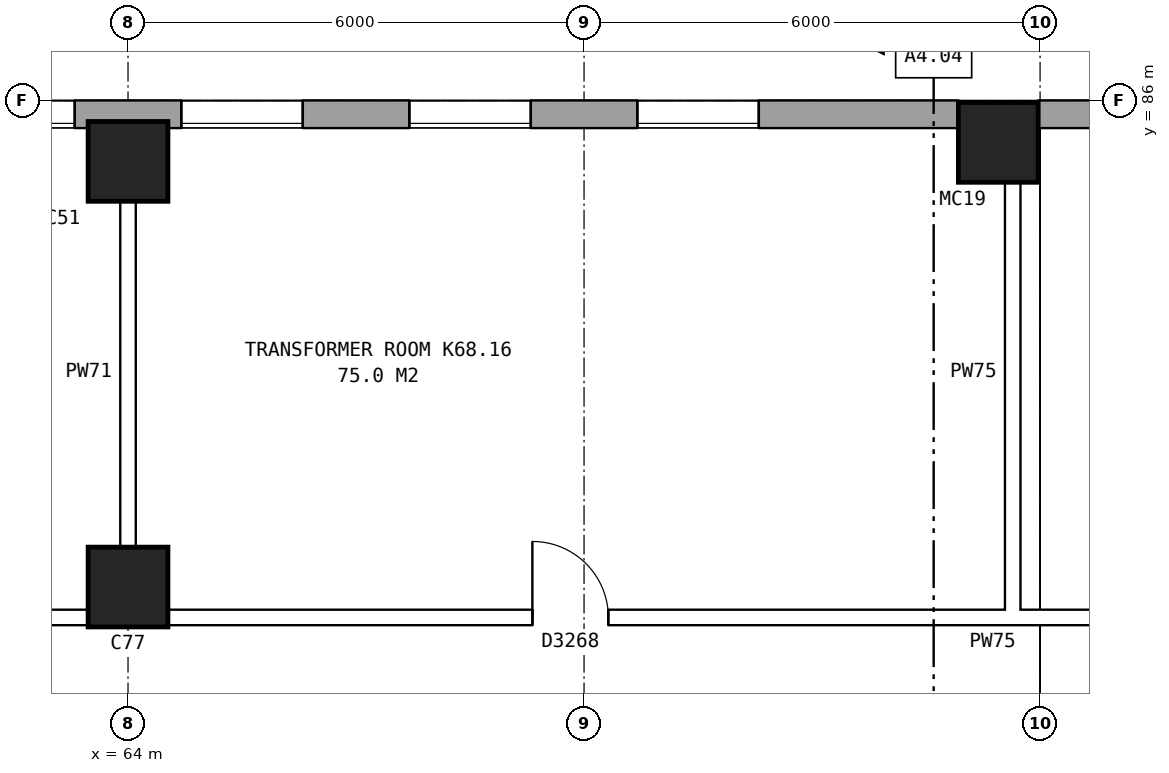
"""IFC4 building model, lengths in metres.
Left out: names, types, materials, properties, quantities, classifications, styles, units other than length and angle.
Written with IfcOpenShell. Run it as: python <this file> out.ifc"""

import sys

from ifc_helpers import new_model, si_unit, direction, frame, frame_2d, origin, origin_2d, place, context, subcontext, project, spatial, rectangle, hollow_rectangle, extrude, element, fill, save


model = new_model("IFC4")
c1 = context("Model", 3, precision=1e-05, world=origin(), true_north=direction((0.0, 1.0)))
c2 = subcontext(c1, "Body", "Model", "MODEL_VIEW")
j1 = project(units=[si_unit("LENGTHUNIT", "METRE"), si_unit("PLANEANGLEUNIT", "RADIAN")], contexts=[c1])
p1 = place(None, origin())
s1 = spatial("IfcSite", under=j1, at=p1, CompositionType="ELEMENT")
p2 = place(p1, origin())
s2 = spatial("IfcBuilding", under=s1, at=p2, CompositionType="ELEMENT")
p3 = place(p2, frame((0.0, 0.0, 243.9)))
s3 = spatial("IfcBuildingStorey", under=s2, at=p3, CompositionType="ELEMENT", Elevation=243.9)
p4 = place(p3, frame((64.0, 79.6, 0.0), z_axis=(0.0, 0.0, 1.0), x_axis=(1.0, 0.0, 0.0)))
e1 = element("IfcColumn", 1, at=p4, inside=s3, PredefinedType="COLUMN", context=c2, shape_type="SweptSolid", body=[
    extrude(rectangle(XDim=1.05, YDim=1.05, at=origin_2d()), origin(), (0.0, 0.0, 1.0), 15.563),
])
p5 = place(p3, frame((64.0, 85.2, 0.0), z_axis=(0.0, 0.0, 1.0), x_axis=(1.0, 0.0, 0.0)))
e2 = element("IfcColumn", 2, at=p5, inside=s3, PredefinedType="COLUMN", context=c2, shape_type="SweptSolid", body=[
    extrude(rectangle(XDim=1.05, YDim=1.05, at=origin_2d()), origin(), (0.0, 0.0, 1.0), 18.363),
])
p6 = place(p3, frame((75.45, 85.45, 0.0), z_axis=(0.0, 0.0, 1.0), x_axis=(1.0, 0.0, 0.0)))
e3 = element("IfcColumn", 3, at=p6, inside=s3, PredefinedType="COLUMN", context=c2, shape_type="SweptSolid", body=[
    extrude(hollow_rectangle(XDim=1.05, YDim=1.05, WallThickness=0.053, at=origin_2d()), origin(), (0.0, 0.0, 1.0), 18.488),
])
p7 = place(p3, frame((131.025, 85.82, 0.0), z_axis=(0.0, 0.0, 1.0), x_axis=(-1.0, 0.0, 0.0)))
e4 = element("IfcWall", 4, at=p7, inside=s3, PredefinedType="STANDARD", context=c2, shape_type="SweptSolid", body=[
    extrude(rectangle(XDim=55.05, YDim=0.36, at=frame_2d((27.525, 0.0))), origin(), (0.0, 0.0, 1.0), 19.21),
])
p8 = place(p7, frame((52.506, 0.0, 1.5)))
e5 = element("IfcOpeningElement", 5, at=p8, cuts=e4, PredefinedType="OPENING", context=c2, shape_type="SweptSolid", body=[
    extrude(rectangle(XDim=1.6, YDim=1.2, at=frame_2d((0.8, 0.6))), frame((0.0, 0.19, 0.0), z_axis=(0.0, -1.0, 0.0), x_axis=(1.0, 0.0, 0.0)), (0.0, 0.0, 1.0), 0.38),
])
p9 = place(p7, frame((49.069, 0.0, 1.5)))
e6 = element("IfcOpeningElement", 6, at=p9, cuts=e4, PredefinedType="OPENING", context=c2, shape_type="SweptSolid", body=[
    extrude(rectangle(XDim=1.6, YDim=1.2, at=frame_2d((0.8, 0.6))), frame((0.0, 0.19, 0.0), z_axis=(0.0, -1.0, 0.0), x_axis=(1.0, 0.0, 0.0)), (0.0, 0.0, 1.0), 0.38),
])
p10 = place(p7, frame((45.631, 0.0, 1.5)))
e7 = element("IfcOpeningElement", 7, at=p10, cuts=e4, PredefinedType="OPENING", context=c2, shape_type="SweptSolid", body=[
    extrude(rectangle(XDim=1.6, YDim=1.2, at=frame_2d((0.8, 0.6))), frame((0.0, 0.19, 0.0), z_axis=(0.0, -1.0, 0.0), x_axis=(1.0, 0.0, 0.0)), (0.0, 0.0, 1.0), 0.38),
])
p11 = place(p7, frame((42.194, 0.0, 1.5)))
e8 = element("IfcOpeningElement", 8, at=p11, cuts=e4, PredefinedType="OPENING", context=c2, shape_type="SweptSolid", body=[
    extrude(rectangle(XDim=1.6, YDim=1.2, at=frame_2d((0.8, 0.6))), frame((0.0, 0.19, 0.0), z_axis=(0.0, -1.0, 0.0), x_axis=(1.0, 0.0, 0.0)), (0.0, 0.0, 1.0), 0.38),
])
p12 = place(p7, frame((38.756, 0.0, 1.5)))
e9 = element("IfcOpeningElement", 9, at=p12, cuts=e4, PredefinedType="OPENING", context=c2, shape_type="SweptSolid", body=[
    extrude(rectangle(XDim=1.6, YDim=1.2, at=frame_2d((0.8, 0.6))), frame((0.0, 0.19, 0.0), z_axis=(0.0, -1.0, 0.0), x_axis=(1.0, 0.0, 0.0)), (0.0, 0.0, 1.0), 0.38),
])
p13 = place(p7, frame((35.319, 0.0, 1.5)))
e10 = element("IfcOpeningElement", 10, at=p13, cuts=e4, PredefinedType="OPENING", context=c2, shape_type="SweptSolid", body=[
    extrude(rectangle(XDim=1.6, YDim=1.2, at=frame_2d((0.8, 0.6))), frame((0.0, 0.19, 0.0), z_axis=(0.0, -1.0, 0.0), x_axis=(1.0, 0.0, 0.0)), (0.0, 0.0, 1.0), 0.38),
])
p14 = place(p7, frame((31.881, 0.0, 1.5)))
e11 = element("IfcOpeningElement", 11, at=p14, cuts=e4, PredefinedType="OPENING", context=c2, shape_type="SweptSolid", body=[
    extrude(rectangle(XDim=1.6, YDim=1.2, at=frame_2d((0.8, 0.6))), frame((0.0, 0.19, 0.0), z_axis=(0.0, -1.0, 0.0), x_axis=(1.0, 0.0, 0.0)), (0.0, 0.0, 1.0), 0.38),
])
p15 = place(p7, frame((28.444, 0.0, 1.5)))
e12 = element("IfcOpeningElement", 12, at=p15, cuts=e4, PredefinedType="OPENING", context=c2, shape_type="SweptSolid", body=[
    extrude(rectangle(XDim=1.6, YDim=1.2, at=frame_2d((0.8, 0.6))), frame((0.0, 0.19, 0.0), z_axis=(0.0, -1.0, 0.0), x_axis=(1.0, 0.0, 0.0)), (0.0, 0.0, 1.0), 0.38),
])
p16 = place(p7, frame((25.006, 0.0, 1.5)))
e13 = element("IfcOpeningElement", 13, at=p16, cuts=e4, PredefinedType="OPENING", context=c2, shape_type="SweptSolid", body=[
    extrude(rectangle(XDim=1.6, YDim=1.2, at=frame_2d((0.8, 0.6))), frame((0.0, 0.19, 0.0), z_axis=(0.0, -1.0, 0.0), x_axis=(1.0, 0.0, 0.0)), (0.0, 0.0, 1.0), 0.38),
])
p17 = place(p7, frame((21.569, 0.0, 1.5)))
e14 = element("IfcOpeningElement", 14, at=p17, cuts=e4, PredefinedType="OPENING", context=c2, shape_type="SweptSolid", body=[
    extrude(rectangle(XDim=1.6, YDim=1.2, at=frame_2d((0.8, 0.6))), frame((0.0, 0.19, 0.0), z_axis=(0.0, -1.0, 0.0), x_axis=(1.0, 0.0, 0.0)), (0.0, 0.0, 1.0), 0.38),
])
p18 = place(p7, frame((18.131, 0.0, 1.5)))
e15 = element("IfcOpeningElement", 15, at=p18, cuts=e4, PredefinedType="OPENING", context=c2, shape_type="SweptSolid", body=[
    extrude(rectangle(XDim=1.6, YDim=1.2, at=frame_2d((0.8, 0.6))), frame((0.0, 0.19, 0.0), z_axis=(0.0, -1.0, 0.0), x_axis=(1.0, 0.0, 0.0)), (0.0, 0.0, 1.0), 0.38),
])
p19 = place(p7, frame((14.694, 0.0, 1.5)))
e16 = element("IfcOpeningElement", 16, at=p19, cuts=e4, PredefinedType="OPENING", context=c2, shape_type="SweptSolid", body=[
    extrude(rectangle(XDim=1.6, YDim=1.2, at=frame_2d((0.8, 0.6))), frame((0.0, 0.19, 0.0), z_axis=(0.0, -1.0, 0.0), x_axis=(1.0, 0.0, 0.0)), (0.0, 0.0, 1.0), 0.38),
])
p20 = place(p7, frame((11.256, 0.0, 1.5)))
e17 = element("IfcOpeningElement", 17, at=p20, cuts=e4, PredefinedType="OPENING", context=c2, shape_type="SweptSolid", body=[
    extrude(rectangle(XDim=1.6, YDim=1.2, at=frame_2d((0.8, 0.6))), frame((0.0, 0.19, 0.0), z_axis=(0.0, -1.0, 0.0), x_axis=(1.0, 0.0, 0.0)), (0.0, 0.0, 1.0), 0.38),
])
p21 = place(p7, frame((7.819, 0.0, 1.5)))
e18 = element("IfcOpeningElement", 18, at=p21, cuts=e4, PredefinedType="OPENING", context=c2, shape_type="SweptSolid", body=[
    extrude(rectangle(XDim=1.6, YDim=1.2, at=frame_2d((0.8, 0.6))), frame((0.0, 0.19, 0.0), z_axis=(0.0, -1.0, 0.0), x_axis=(1.0, 0.0, 0.0)), (0.0, 0.0, 1.0), 0.38),
])
p22 = place(p7, frame((4.381, 0.0, 1.5)))
e19 = element("IfcOpeningElement", 19, at=p22, cuts=e4, PredefinedType="OPENING", context=c2, shape_type="SweptSolid", body=[
    extrude(rectangle(XDim=1.6, YDim=1.2, at=frame_2d((0.8, 0.6))), frame((0.0, 0.19, 0.0), z_axis=(0.0, -1.0, 0.0), x_axis=(1.0, 0.0, 0.0)), (0.0, 0.0, 1.0), 0.38),
])
p23 = place(p7, frame((0.944, 0.0, 1.5)))
e20 = element("IfcOpeningElement", 20, at=p23, cuts=e4, PredefinedType="OPENING", context=c2, shape_type="SweptSolid", body=[
    extrude(rectangle(XDim=1.6, YDim=1.2, at=frame_2d((0.8, 0.6))), frame((0.0, 0.19, 0.0), z_axis=(0.0, -1.0, 0.0), x_axis=(1.0, 0.0, 0.0)), (0.0, 0.0, 1.0), 0.38),
])
p24 = place(p3, frame((74.925, 85.82, 0.0), z_axis=(0.0, 0.0, 1.0), x_axis=(-1.0, 0.0, 0.0)))
e21 = element("IfcWall", 21, at=p24, inside=s3, PredefinedType="STANDARD", context=c2, shape_type="SweptSolid", body=[
    extrude(rectangle(XDim=39.851, YDim=0.36, at=frame_2d((19.925, 0.0))), origin(), (0.0, 0.0, 1.0), 19.21),
])
p25 = place(p24, frame((35.625, 0.0, 1.5)))
e22 = element("IfcOpeningElement", 22, at=p25, cuts=e21, PredefinedType="OPENING", context=c2, shape_type="SweptSolid", body=[
    extrude(rectangle(XDim=1.6, YDim=1.2, at=frame_2d((0.8, 0.6))), frame((0.0, 0.19, 0.0), z_axis=(0.0, -1.0, 0.0), x_axis=(1.0, 0.0, 0.0)), (0.0, 0.0, 1.0), 0.38),
])
p26 = place(p24, frame((32.625, 0.0, 1.5)))
e23 = element("IfcOpeningElement", 23, at=p26, cuts=e21, PredefinedType="OPENING", context=c2, shape_type="SweptSolid", body=[
    extrude(rectangle(XDim=1.6, YDim=1.2, at=frame_2d((0.8, 0.6))), frame((0.0, 0.19, 0.0), z_axis=(0.0, -1.0, 0.0), x_axis=(1.0, 0.0, 0.0)), (0.0, 0.0, 1.0), 0.38),
])
p27 = place(p24, frame((29.625, 0.0, 1.5)))
e24 = element("IfcOpeningElement", 24, at=p27, cuts=e21, PredefinedType="OPENING", context=c2, shape_type="SweptSolid", body=[
    extrude(rectangle(XDim=1.6, YDim=1.2, at=frame_2d((0.8, 0.6))), frame((0.0, 0.19, 0.0), z_axis=(0.0, -1.0, 0.0), x_axis=(1.0, 0.0, 0.0)), (0.0, 0.0, 1.0), 0.38),
])
p28 = place(p24, frame((26.625, 0.0, 1.5)))
e25 = element("IfcOpeningElement", 25, at=p28, cuts=e21, PredefinedType="OPENING", context=c2, shape_type="SweptSolid", body=[
    extrude(rectangle(XDim=1.6, YDim=1.2, at=frame_2d((0.8, 0.6))), frame((0.0, 0.19, 0.0), z_axis=(0.0, -1.0, 0.0), x_axis=(1.0, 0.0, 0.0)), (0.0, 0.0, 1.0), 0.38),
])
p29 = place(p24, frame((23.625, 0.0, 1.5)))
e26 = element("IfcOpeningElement", 26, at=p29, cuts=e21, PredefinedType="OPENING", context=c2, shape_type="SweptSolid", body=[
    extrude(rectangle(XDim=1.6, YDim=1.2, at=frame_2d((0.8, 0.6))), frame((0.0, 0.19, 0.0), z_axis=(0.0, -1.0, 0.0), x_axis=(1.0, 0.0, 0.0)), (0.0, 0.0, 1.0), 0.38),
])
p30 = place(p24, frame((20.625, 0.0, 1.5)))
e27 = element("IfcOpeningElement", 27, at=p30, cuts=e21, PredefinedType="OPENING", context=c2, shape_type="SweptSolid", body=[
    extrude(rectangle(XDim=1.6, YDim=1.2, at=frame_2d((0.8, 0.6))), frame((0.0, 0.19, 0.0), z_axis=(0.0, -1.0, 0.0), x_axis=(1.0, 0.0, 0.0)), (0.0, 0.0, 1.0), 0.38),
])
p31 = place(p24, frame((17.625, 0.0, 1.5)))
e28 = element("IfcOpeningElement", 28, at=p31, cuts=e21, PredefinedType="OPENING", context=c2, shape_type="SweptSolid", body=[
    extrude(rectangle(XDim=1.6, YDim=1.2, at=frame_2d((0.8, 0.6))), frame((0.0, 0.19, 0.0), z_axis=(0.0, -1.0, 0.0), x_axis=(1.0, 0.0, 0.0)), (0.0, 0.0, 1.0), 0.38),
])
p32 = place(p24, frame((14.625, 0.0, 1.5)))
e29 = element("IfcOpeningElement", 29, at=p32, cuts=e21, PredefinedType="OPENING", context=c2, shape_type="SweptSolid", body=[
    extrude(rectangle(XDim=1.6, YDim=1.2, at=frame_2d((0.8, 0.6))), frame((0.0, 0.19, 0.0), z_axis=(0.0, -1.0, 0.0), x_axis=(1.0, 0.0, 0.0)), (0.0, 0.0, 1.0), 0.38),
])
p33 = place(p24, frame((11.625, 0.0, 1.5)))
e30 = element("IfcOpeningElement", 30, at=p33, cuts=e21, PredefinedType="OPENING", context=c2, shape_type="SweptSolid", body=[
    extrude(rectangle(XDim=1.6, YDim=1.2, at=frame_2d((0.8, 0.6))), frame((0.0, 0.19, 0.0), z_axis=(0.0, -1.0, 0.0), x_axis=(1.0, 0.0, 0.0)), (0.0, 0.0, 1.0), 0.38),
])
p34 = place(p24, frame((8.625, 0.0, 1.5)))
e31 = element("IfcOpeningElement", 31, at=p34, cuts=e21, PredefinedType="OPENING", context=c2, shape_type="SweptSolid", body=[
    extrude(rectangle(XDim=1.6, YDim=1.2, at=frame_2d((0.8, 0.6))), frame((0.0, 0.19, 0.0), z_axis=(0.0, -1.0, 0.0), x_axis=(1.0, 0.0, 0.0)), (0.0, 0.0, 1.0), 0.38),
])
p35 = place(p24, frame((5.625, 0.0, 1.5)))
e32 = element("IfcOpeningElement", 32, at=p35, cuts=e21, PredefinedType="OPENING", context=c2, shape_type="SweptSolid", body=[
    extrude(rectangle(XDim=1.6, YDim=1.2, at=frame_2d((0.8, 0.6))), frame((0.0, 0.19, 0.0), z_axis=(0.0, -1.0, 0.0), x_axis=(1.0, 0.0, 0.0)), (0.0, 0.0, 1.0), 0.38),
])
p36 = place(p24, frame((2.625, 0.0, 1.5)))
e33 = element("IfcOpeningElement", 33, at=p36, cuts=e21, PredefinedType="OPENING", context=c2, shape_type="SweptSolid", body=[
    extrude(rectangle(XDim=1.6, YDim=1.2, at=frame_2d((0.8, 0.6))), frame((0.0, 0.19, 0.0), z_axis=(0.0, -1.0, 0.0), x_axis=(1.0, 0.0, 0.0)), (0.0, 0.0, 1.0), 0.38),
])
p37 = place(p3, frame((32.24, 79.2, 0.0), z_axis=(0.0, 0.0, 1.0), x_axis=(1.0, 0.0, 0.0)))
e34 = element("IfcWall", 34, at=p37, inside=s3, PredefinedType="PARTITIONING", context=c2, shape_type="SweptSolid", body=[
    extrude(rectangle(XDim=136.52, YDim=0.2, at=frame_2d((68.26, 0.0))), origin(), (0.0, 0.0, 1.0), 3.3),
])
p38 = place(p37, frame((3.44, 0.0, 0.0)))
e35 = element("IfcOpeningElement", 35, at=p38, cuts=e34, PredefinedType="OPENING", context=c2, shape_type="SweptSolid", body=[
    extrude(rectangle(XDim=1.0, YDim=2.1, at=frame_2d((0.5, 1.05))), frame((0.0, 0.11, 0.0), z_axis=(0.0, -1.0, 0.0), x_axis=(1.0, 0.0, 0.0)), (0.0, 0.0, 1.0), 0.22),
])
p39 = place(p37, frame((13.26, 0.0, 0.0)))
e36 = element("IfcOpeningElement", 36, at=p39, cuts=e34, PredefinedType="OPENING", context=c2, shape_type="SweptSolid", body=[
    extrude(rectangle(XDim=1.0, YDim=2.1, at=frame_2d((0.5, 1.05))), frame((0.0, 0.11, 0.0), z_axis=(0.0, -1.0, 0.0), x_axis=(1.0, 0.0, 0.0)), (0.0, 0.0, 1.0), 0.22),
])
p40 = place(p37, frame((25.26, 0.0, 0.0)))
e37 = element("IfcOpeningElement", 37, at=p40, cuts=e34, PredefinedType="OPENING", context=c2, shape_type="SweptSolid", body=[
    extrude(rectangle(XDim=1.0, YDim=2.1, at=frame_2d((0.5, 1.05))), frame((0.0, 0.11, 0.0), z_axis=(0.0, -1.0, 0.0), x_axis=(1.0, 0.0, 0.0)), (0.0, 0.0, 1.0), 0.22),
])
p41 = place(p37, frame((37.08, 0.0, 0.0)))
e38 = element("IfcOpeningElement", 38, at=p41, cuts=e34, PredefinedType="OPENING", context=c2, shape_type="SweptSolid", body=[
    extrude(rectangle(XDim=1.0, YDim=2.1, at=frame_2d((0.5, 1.05))), frame((0.0, 0.11, 0.0), z_axis=(0.0, -1.0, 0.0), x_axis=(1.0, 0.0, 0.0)), (0.0, 0.0, 1.0), 0.22),
])
p42 = place(p37, frame((49.955, 0.0, 0.0)))
e39 = element("IfcOpeningElement", 39, at=p42, cuts=e34, PredefinedType="OPENING", context=c2, shape_type="SweptSolid", body=[
    extrude(rectangle(XDim=1.0, YDim=2.1, at=frame_2d((0.5, 1.05))), frame((0.0, 0.11, 0.0), z_axis=(0.0, -1.0, 0.0), x_axis=(1.0, 0.0, 0.0)), (0.0, 0.0, 1.0), 0.22),
])
p43 = place(p37, frame((67.322, 0.0, 0.0)))
e40 = element("IfcOpeningElement", 40, at=p43, cuts=e34, PredefinedType="OPENING", context=c2, shape_type="SweptSolid", body=[
    extrude(rectangle(XDim=1.0, YDim=2.1, at=frame_2d((0.5, 1.05))), frame((0.0, 0.11, 0.0), z_axis=(0.0, -1.0, 0.0), x_axis=(1.0, 0.0, 0.0)), (0.0, 0.0, 1.0), 0.22),
])
p44 = place(p37, frame((84.51, 0.0, 0.0)))
e41 = element("IfcOpeningElement", 41, at=p44, cuts=e34, PredefinedType="OPENING", context=c2, shape_type="SweptSolid", body=[
    extrude(rectangle(XDim=1.0, YDim=2.1, at=frame_2d((0.5, 1.05))), frame((0.0, 0.11, 0.0), z_axis=(0.0, -1.0, 0.0), x_axis=(1.0, 0.0, 0.0)), (0.0, 0.0, 1.0), 0.22),
])
p45 = place(p37, frame((95.003, 0.0, 0.0)))
e42 = element("IfcOpeningElement", 42, at=p45, cuts=e34, PredefinedType="OPENING", context=c2, shape_type="SweptSolid", body=[
    extrude(rectangle(XDim=1.0, YDim=2.1, at=frame_2d((0.5, 1.05))), frame((0.0, 0.11, 0.0), z_axis=(0.0, -1.0, 0.0), x_axis=(1.0, 0.0, 0.0)), (0.0, 0.0, 1.0), 0.22),
])
p46 = place(p37, frame((104.44, 0.0, 0.0)))
e43 = element("IfcOpeningElement", 43, at=p46, cuts=e34, PredefinedType="OPENING", context=c2, shape_type="SweptSolid", body=[
    extrude(rectangle(XDim=1.0, YDim=2.1, at=frame_2d((0.5, 1.05))), frame((0.0, 0.11, 0.0), z_axis=(0.0, -1.0, 0.0), x_axis=(1.0, 0.0, 0.0)), (0.0, 0.0, 1.0), 0.22),
])
p47 = place(p37, frame((123.48, 0.0, 0.0)))
e44 = element("IfcOpeningElement", 44, at=p47, cuts=e34, PredefinedType="OPENING", context=c2, shape_type="SweptSolid", body=[
    extrude(rectangle(XDim=1.0, YDim=2.1, at=frame_2d((0.5, 1.05))), frame((0.0, 0.11, 0.0), z_axis=(0.0, -1.0, 0.0), x_axis=(1.0, 0.0, 0.0)), (0.0, 0.0, 1.0), 0.22),
])
for number, where, z_axis, x_axis in (
    (45, (64.0, 79.1, 0.0), (0.0, 0.0, 1.0), (0.0, 1.0, 0.0)),
    (46, (75.64, 79.1, 0.0), (0.0, 0.0, 1.0), (0.0, 1.0, 0.0)),
):
    element("IfcWall", number, at=place(p3, frame(where, z_axis=z_axis, x_axis=x_axis)), inside=s3, PredefinedType="PARTITIONING", context=c2, shape_type="SweptSolid", body=[
        extrude(rectangle(XDim=6.66, YDim=0.2, at=frame_2d((3.33, 0.0))), origin(), (0.0, 0.0, 1.0), 3.3),
    ])
p48 = place(p33, origin())
e47 = element("IfcWindow", 47, at=p48, inside=s3, PartitioningType="DOUBLE_PANEL_HORIZONTAL", PredefinedType="WINDOW", context=c2, shape_type="SweptSolid", body=[
    extrude(rectangle(XDim=1.6, YDim=1.2, at=frame_2d((0.8, 0.6))), frame((0.0, 0.15, 0.0), z_axis=(0.0, -1.0, 0.0), x_axis=(1.0, 0.0, 0.0)), (0.0, 0.0, 1.0), 0.06),
])
fill(e30, e47)
p49 = place(p34, origin())
e48 = element("IfcWindow", 48, at=p49, inside=s3, PartitioningType="DOUBLE_PANEL_HORIZONTAL", PredefinedType="WINDOW", context=c2, shape_type="SweptSolid", body=[
    extrude(rectangle(XDim=1.6, YDim=1.2, at=frame_2d((0.8, 0.6))), frame((0.0, 0.15, 0.0), z_axis=(0.0, -1.0, 0.0), x_axis=(1.0, 0.0, 0.0)), (0.0, 0.0, 1.0), 0.06),
])
fill(e31, e48)
p50 = place(p35, origin())
e49 = element("IfcWindow", 49, at=p50, inside=s3, PartitioningType="DOUBLE_PANEL_HORIZONTAL", PredefinedType="WINDOW", context=c2, shape_type="SweptSolid", body=[
    extrude(rectangle(XDim=1.6, YDim=1.2, at=frame_2d((0.8, 0.6))), frame((0.0, 0.15, 0.0), z_axis=(0.0, -1.0, 0.0), x_axis=(1.0, 0.0, 0.0)), (0.0, 0.0, 1.0), 0.06),
])
fill(e32, e49)
p51 = place(p36, origin())
e50 = element("IfcWindow", 50, at=p51, inside=s3, PartitioningType="DOUBLE_PANEL_HORIZONTAL", PredefinedType="WINDOW", context=c2, shape_type="SweptSolid", body=[
    extrude(rectangle(XDim=1.6, YDim=1.2, at=frame_2d((0.8, 0.6))), frame((0.0, 0.15, 0.0), z_axis=(0.0, -1.0, 0.0), x_axis=(1.0, 0.0, 0.0)), (0.0, 0.0, 1.0), 0.06),
])
fill(e33, e50)
p52 = place(p41, origin())
e51 = element("IfcDoor", 51, at=p52, inside=s3, OperationType="SINGLE_SWING_LEFT", PredefinedType="DOOR", context=c2, shape_type="SweptSolid", body=[
    extrude(rectangle(XDim=1.0, YDim=2.1, at=frame_2d((0.5, 1.05))), frame((0.0, 0.025, 0.0), z_axis=(0.0, -1.0, 0.0), x_axis=(1.0, 0.0, 0.0)), (0.0, 0.0, 1.0), 0.05),
])
fill(e38, e51)
save(model, sys.argv[1])
